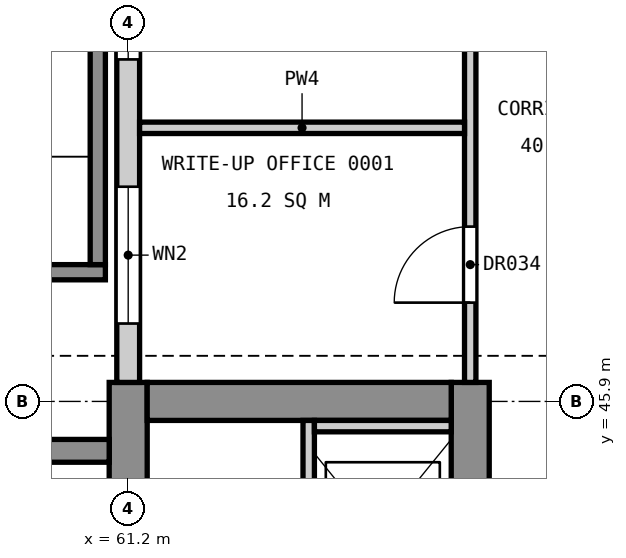
"""IFC4 building model, lengths in metres.
Left out: names, types, materials, properties, quantities, classifications, styles, units other than length and angle.
Written with IfcOpenShell. Run it as: python <this file> out.ifc"""

import sys

from ifc_helpers import new_model, si_unit, direction, frame, frame_2d, origin, place, context, subcontext, project, spatial, rectangle, extrude, element, fill, save


model = new_model("IFC4")
c1 = context("Model", 3, precision=1e-05, world=origin(), true_north=direction((0.0, 1.0)))
c2 = subcontext(c1, "Body", "Model", "MODEL_VIEW")
j1 = project(units=[si_unit("LENGTHUNIT", "METRE"), si_unit("PLANEANGLEUNIT", "RADIAN")], contexts=[c1])
p1 = place(None, origin())
s1 = spatial("IfcSite", under=j1, at=p1, CompositionType="ELEMENT")
p2 = place(p1, origin())
s2 = spatial("IfcBuilding", under=s1, at=p2, CompositionType="ELEMENT")
p3 = place(p2, origin())
s3 = spatial("IfcBuildingStorey", under=s2, at=p3, CompositionType="ELEMENT", Elevation=0.0)
p4 = place(p3, frame((61.2, 34.85, 0.0), z_axis=(0.0, 0.0, 1.0), x_axis=(0.0, 1.0, 0.0)))
e1 = element("IfcWall", 1, at=p4, inside=s3, PredefinedType="SHEAR", context=c2, shape_type="SweptSolid", body=[
    extrude(rectangle(XDim=11.3, YDim=0.5, at=frame_2d((5.65, 0.0))), origin(), (0.0, 0.0, 1.0), 5.7),
])
p5 = place(p4, frame((0.55, 0.0, 0.0)))
e2 = element("IfcOpeningElement", 2, at=p5, cuts=e1, PredefinedType="OPENING", context=c2, shape_type="SweptSolid", body=[
    extrude(rectangle(XDim=1.4, YDim=2.1, at=frame_2d((0.7, 1.05))), frame((0.0, 0.26, 0.0), z_axis=(0.0, -1.0, 0.0), x_axis=(1.0, 0.0, 0.0)), (0.0, 0.0, 1.0), 0.52),
])
p6 = place(p4, frame((6.58, 0.0, 3.4)))
e3 = element("IfcOpeningElement", 3, at=p6, cuts=e1, PredefinedType="OPENING", context=c2, shape_type="SweptSolid", body=[
    extrude(rectangle(XDim=1.2, YDim=0.9, at=frame_2d((0.6, 0.45))), frame((0.0, 0.26, 0.0), z_axis=(0.0, -1.0, 0.0), x_axis=(1.0, 0.0, 0.0)), (0.0, 0.0, 1.0), 0.52),
])
p7 = place(p3, frame((65.7, 34.85, 0.0), z_axis=(0.0, 0.0, 1.0), x_axis=(0.0, 1.0, 0.0)))
e4 = element("IfcWall", 4, at=p7, inside=s3, PredefinedType="SHEAR", context=c2, shape_type="SweptSolid", body=[
    extrude(rectangle(XDim=11.3, YDim=0.5, at=frame_2d((5.65, 0.0))), origin(), (0.0, 0.0, 1.0), 5.7),
])
p8 = place(p7, frame((0.55, 0.0, 0.0)))
e5 = element("IfcOpeningElement", 5, at=p8, cuts=e4, PredefinedType="OPENING", context=c2, shape_type="SweptSolid", body=[
    extrude(rectangle(XDim=1.4, YDim=2.1, at=frame_2d((0.7, 1.05))), frame((0.0, 0.26, 0.0), z_axis=(0.0, -1.0, 0.0), x_axis=(1.0, 0.0, 0.0)), (0.0, 0.0, 1.0), 0.52),
])
p9 = place(p7, frame((8.8, 0.0, 0.0)))
e6 = element("IfcOpeningElement", 6, at=p9, cuts=e4, PredefinedType="OPENING", context=c2, shape_type="SweptSolid", body=[
    extrude(rectangle(XDim=1.1, YDim=2.1, at=frame_2d((0.55, 1.05))), frame((0.0, 0.26, 0.0), z_axis=(0.0, -1.0, 0.0), x_axis=(1.0, 0.0, 0.0)), (0.0, 0.0, 1.0), 0.52),
])
p10 = place(p3, frame((61.45, 45.9, 0.0), z_axis=(0.0, 0.0, 1.0), x_axis=(1.0, 0.0, 0.0)))
e7 = element("IfcWall", 7, at=p10, inside=s3, PredefinedType="SHEAR", context=c2, shape_type="SweptSolid", body=[
    extrude(rectangle(XDim=4.0, YDim=0.5, at=frame_2d((2.0, 0.0))), origin(), (0.0, 0.0, 1.0), 5.7),
])
p11 = place(p3, frame((60.95, 45.25, 0.0), z_axis=(0.0, 0.0, 1.0), x_axis=(-1.0, 0.0, 0.0)))
e8 = element("IfcWall", 8, at=p11, inside=s3, PredefinedType="SHEAR", context=c2, shape_type="SweptSolid", body=[
    extrude(rectangle(XDim=1.25, YDim=0.3, at=frame_2d((0.625, 0.0))), origin(), (0.0, 0.0, 1.0), 6.0),
])
p12 = place(p3, frame((63.575, 43.0, 0.0), z_axis=(0.0, 0.0, 1.0), x_axis=(0.0, 1.0, 0.0)))
e9 = element("IfcWall", 9, at=p12, inside=s3, PredefinedType="SOLIDWALL", context=c2, shape_type="SweptSolid", body=[
    extrude(rectangle(XDim=2.65, YDim=0.15, at=frame_2d((1.325, 0.0))), origin(), (0.0, 0.0, 1.0), 6.0),
])
p13 = place(p3, frame((63.65, 45.575, 0.0), z_axis=(0.0, 0.0, 1.0), x_axis=(1.0, 0.0, 0.0)))
e10 = element("IfcWall", 10, at=p13, inside=s3, PredefinedType="SOLIDWALL", context=c2, shape_type="SweptSolid", body=[
    extrude(rectangle(XDim=1.8, YDim=0.15, at=frame_2d((0.9, 0.0))), origin(), (0.0, 0.0, 1.0), 6.0),
])
p14 = place(p3, frame((61.2, 46.15, 0.0), z_axis=(0.0, 0.0, 1.0), x_axis=(0.0, 1.0, 0.0)))
e11 = element("IfcWall", 11, at=p14, inside=s3, PredefinedType="STANDARD", context=c2, shape_type="SweptSolid", body=[
    extrude(rectangle(XDim=10.0, YDim=0.3, at=frame_2d((5.0, 0.0))), origin(), (0.0, 0.0, 1.0), 4.7),
])
p15 = place(p14, frame((0.775, 0.0, 0.9)))
e12 = element("IfcOpeningElement", 12, at=p15, cuts=e11, PredefinedType="OPENING", context=c2, shape_type="SweptSolid", body=[
    extrude(rectangle(XDim=1.8, YDim=3.0, at=frame_2d((0.9, 1.5))), frame((0.0, 0.16, 0.0), z_axis=(0.0, -1.0, 0.0), x_axis=(1.0, 0.0, 0.0)), (0.0, 0.0, 1.0), 0.32),
])
p16 = place(p14, frame((4.25, 0.0, 0.9)))
e13 = element("IfcOpeningElement", 13, at=p16, cuts=e11, PredefinedType="OPENING", context=c2, shape_type="SweptSolid", body=[
    extrude(rectangle(XDim=1.8, YDim=3.0, at=frame_2d((0.9, 1.5))), frame((0.0, 0.16, 0.0), z_axis=(0.0, -1.0, 0.0), x_axis=(1.0, 0.0, 0.0)), (0.0, 0.0, 1.0), 0.32),
])
p17 = place(p14, frame((7.575, 0.0, 0.9)))
e14 = element("IfcOpeningElement", 14, at=p17, cuts=e11, PredefinedType="OPENING", context=c2, shape_type="SweptSolid", body=[
    extrude(rectangle(XDim=1.8, YDim=3.0, at=frame_2d((0.9, 1.5))), frame((0.0, 0.16, 0.0), z_axis=(0.0, -1.0, 0.0), x_axis=(1.0, 0.0, 0.0)), (0.0, 0.0, 1.0), 0.32),
])
p18 = place(p3, frame((65.7, 46.15, 0.0), z_axis=(0.0, 0.0, 1.0), x_axis=(0.0, 1.0, 0.0)))
e15 = element("IfcWall", 15, at=p18, inside=s3, PredefinedType="PARTITIONING", context=c2, shape_type="SweptSolid", body=[
    extrude(rectangle(XDim=10.4, YDim=0.15, at=frame_2d((5.2, 0.0))), origin(), (0.0, 0.0, 1.0), 4.6),
])
p19 = place(p18, frame((1.05, 0.0, 0.0)))
e16 = element("IfcOpeningElement", 16, at=p19, cuts=e15, PredefinedType="OPENING", context=c2, shape_type="SweptSolid", body=[
    extrude(rectangle(XDim=1.0, YDim=2.1, at=frame_2d((0.5, 1.05))), frame((0.0, 0.085, 0.0), z_axis=(0.0, -1.0, 0.0), x_axis=(1.0, 0.0, 0.0)), (0.0, 0.0, 1.0), 0.17),
])
p20 = place(p18, frame((4.65, 0.0, 0.0)))
e17 = element("IfcOpeningElement", 17, at=p20, cuts=e15, PredefinedType="OPENING", context=c2, shape_type="SweptSolid", body=[
    extrude(rectangle(XDim=1.0, YDim=2.1, at=frame_2d((0.5, 1.05))), frame((0.0, 0.085, 0.0), z_axis=(0.0, -1.0, 0.0), x_axis=(1.0, 0.0, 0.0)), (0.0, 0.0, 1.0), 0.17),
])
p21 = place(p18, frame((8.25, 0.0, 0.0)))
e18 = element("IfcOpeningElement", 18, at=p21, cuts=e15, PredefinedType="OPENING", context=c2, shape_type="SweptSolid", body=[
    extrude(rectangle(XDim=1.0, YDim=2.1, at=frame_2d((0.5, 1.05))), frame((0.0, 0.085, 0.0), z_axis=(0.0, -1.0, 0.0), x_axis=(1.0, 0.0, 0.0)), (0.0, 0.0, 1.0), 0.17),
])
p22 = place(p3, frame((61.35, 49.5, 0.0), z_axis=(0.0, 0.0, 1.0), x_axis=(1.0, 0.0, 0.0)))
e19 = element("IfcWall", 19, at=p22, inside=s3, PredefinedType="PARTITIONING", context=c2, shape_type="SweptSolid", body=[
    extrude(rectangle(XDim=4.275, YDim=0.15, at=frame_2d((2.137, 0.0))), origin(), (0.0, 0.0, 1.0), 4.9),
])
p23 = place(p3, frame((55.9, 47.6, 0.0), z_axis=(0.0, 0.0, 1.0), x_axis=(1.0, 0.0, 0.0)))
e20 = element("IfcWall", 20, at=p23, inside=s3, PredefinedType="SOLIDWALL", context=c2, shape_type="SweptSolid", body=[
    extrude(rectangle(XDim=5.0, YDim=0.2, at=frame_2d((2.5, 0.0))), origin(), (0.0, 0.0, 1.0), 3.3),
])
p24 = place(p23, frame((1.8, 0.0, 0.0)))
e21 = element("IfcOpeningElement", 21, at=p24, cuts=e20, PredefinedType="OPENING", context=c2, shape_type="SweptSolid", body=[
    extrude(rectangle(XDim=1.4, YDim=2.1, at=frame_2d((0.7, 1.05))), frame((0.0, 0.11, 0.0), z_axis=(0.0, -1.0, 0.0), x_axis=(1.0, 0.0, 0.0)), (0.0, 0.0, 1.0), 0.22),
])
p25 = place(p3, frame((60.8, 47.7, 0.0), z_axis=(0.0, 0.0, 1.0), x_axis=(0.0, 1.0, 0.0)))
e22 = element("IfcWall", 22, at=p25, inside=s3, PredefinedType="SOLIDWALL", context=c2, shape_type="SweptSolid", body=[
    extrude(rectangle(XDim=6.8, YDim=0.2, at=frame_2d((3.4, 0.0))), origin(), (0.0, 0.0, 1.0), 3.3),
])
p26 = place(p15, origin())
e23 = element("IfcWindow", 23, at=p26, inside=s3, PartitioningType="SINGLE_PANEL", PredefinedType="WINDOW", context=c2, shape_type="SweptSolid", body=[
    extrude(rectangle(XDim=1.8, YDim=3.0, at=frame_2d((0.9, 1.5))), frame((0.0, 0.03, 0.0), z_axis=(0.0, -1.0, 0.0), x_axis=(1.0, 0.0, 0.0)), (0.0, 0.0, 1.0), 0.06),
])
fill(e12, e23)
p27 = place(p16, origin())
e24 = element("IfcWindow", 24, at=p27, inside=s3, PartitioningType="SINGLE_PANEL", PredefinedType="WINDOW", context=c2, shape_type="SweptSolid", body=[
    extrude(rectangle(XDim=1.8, YDim=3.0, at=frame_2d((0.9, 1.5))), frame((0.0, 0.03, 0.0), z_axis=(0.0, -1.0, 0.0), x_axis=(1.0, 0.0, 0.0)), (0.0, 0.0, 1.0), 0.06),
])
fill(e13, e24)
p28 = place(p19, origin())
e25 = element("IfcDoor", 25, at=p28, inside=s3, OperationType="SINGLE_SWING_LEFT", PredefinedType="DOOR", context=c2, shape_type="SweptSolid", body=[
    extrude(rectangle(XDim=1.0, YDim=2.1, at=frame_2d((0.5, 1.05))), frame((0.0, 0.025, 0.0), z_axis=(0.0, -1.0, 0.0), x_axis=(1.0, 0.0, 0.0)), (0.0, 0.0, 1.0), 0.05),
])
fill(e16, e25)
save(model, sys.argv[1])
